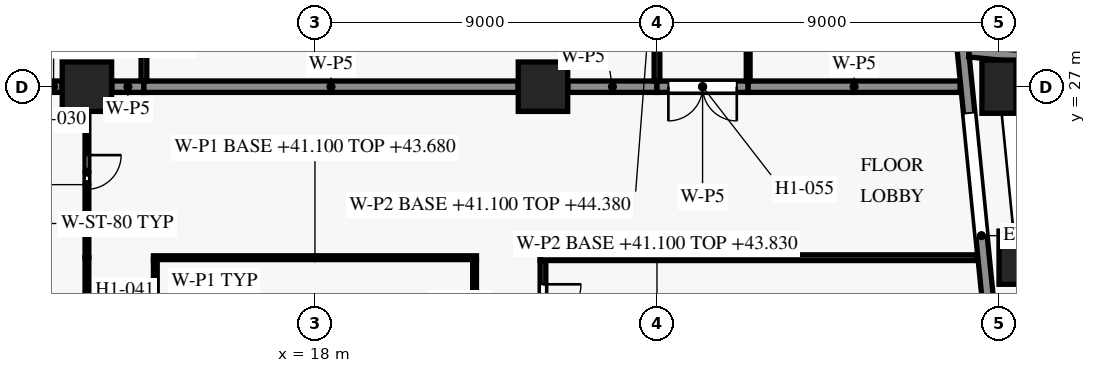
"""IFC4 building model, lengths in metres.
Left out: names, types, materials, properties, quantities, classifications, styles, units other than length and angle.
Written with IfcOpenShell. Run it as: python <this file> out.ifc"""

import sys

from ifc_helpers import new_model, si_unit, direction, frame, frame_2d, origin, origin_2d, place, context, subcontext, project, spatial, rectangle, extrude, element, fill, save


model = new_model("IFC4")
c1 = context("Model", 3, precision=1e-05, world=origin(), true_north=direction((0.0, 1.0)))
c2 = subcontext(c1, "Body", "Model", "MODEL_VIEW")
j1 = project(units=[si_unit("LENGTHUNIT", "METRE"), si_unit("PLANEANGLEUNIT", "RADIAN")], contexts=[c1])
p1 = place(None, origin())
s1 = spatial("IfcSite", under=j1, at=p1, CompositionType="ELEMENT")
p2 = place(p1, origin())
s2 = spatial("IfcBuilding", under=s1, at=p2, CompositionType="ELEMENT")
p3 = place(p2, frame((0.0, 0.0, 41.1)))
s3 = spatial("IfcBuildingStorey", under=s2, at=p3, CompositionType="ELEMENT", Elevation=41.1)
for number, where, z_axis, x_axis in (
    (1, (36.45, 22.5, 0.0), (0.0, 0.0, 1.0), (-0.1, 0.995, 0.0)),
    (2, (36.0, 27.0, 0.0), (0.0, 0.0, 1.0), (-0.1, 0.995, 0.0)),
):
    element("IfcColumn", number, at=place(p3, frame(where, z_axis=z_axis, x_axis=x_axis)), inside=s3, PredefinedType="COLUMN", context=c2, shape_type="SweptSolid", body=[
        extrude(rectangle(XDim=0.9, YDim=1.4, at=origin_2d()), origin(), (0.0, 0.0, 1.0), 3.6),
    ])
for number, where, z_axis, x_axis in (
    (3, (12.0, 27.0, 0.0), (0.0, 0.0, 1.0), (1.0, 0.0, 0.0)),
    (4, (24.0, 27.0, 0.0), (0.0, 0.0, 1.0), (1.0, 0.0, 0.0)),
):
    element("IfcColumn", number, at=place(p3, frame(where, z_axis=z_axis, x_axis=x_axis)), inside=s3, PredefinedType="COLUMN", context=c2, shape_type="SweptSolid", body=[
        extrude(rectangle(XDim=1.3, YDim=1.3, at=origin_2d()), origin(), (0.0, 0.0, 1.0), 3.6),
    ])
p4 = place(p3, frame((35.033, 28.132, 0.0), z_axis=(0.0, 0.0, 1.0), x_axis=(0.099487051997, -0.995038856771, 0.0)))
e5 = element("IfcWall", 5, at=p4, inside=s3, PredefinedType="SOLIDWALL", context=c2, shape_type="SweptSolid", body=[
    extrude(rectangle(XDim=10.152, YDim=0.3, at=frame_2d((5.076, 0.0))), origin(), (0.0, 0.0, 1.0), 2.95),
])
p5 = place(p4, frame((1.833, 0.0, 0.15)))
e6 = element("IfcOpeningElement", 6, at=p5, cuts=e5, PredefinedType="OPENING", context=c2, shape_type="SweptSolid", body=[
    extrude(rectangle(XDim=3.3, YDim=2.4, at=frame_2d((1.65, 1.2))), frame((0.0, 0.16, 0.0), z_axis=(0.0, -1.0, 0.0), x_axis=(1.0, 0.0, 0.0)), (0.0, 0.0, 1.0), 0.32),
])
p6 = place(p4, frame((7.106, 0.0, 0.75)))
e7 = element("IfcOpeningElement", 7, at=p6, cuts=e5, PredefinedType="OPENING", context=c2, shape_type="SweptSolid", body=[
    extrude(rectangle(XDim=1.8, YDim=1.8, at=frame_2d((0.9, 0.9))), frame((0.0, 0.16, 0.0), z_axis=(0.0, -1.0, 0.0), x_axis=(1.0, 0.0, 0.0)), (0.0, 0.0, 1.0), 0.32),
])
p7 = place(p3, frame((45.015, 26.953, 0.0), z_axis=(0.0, 0.0, 1.0), x_axis=(-0.995036699177, 0.099508629231, 0.0)))
e8 = element("IfcWall", 8, at=p7, inside=s3, PredefinedType="SOLIDWALL", context=c2, shape_type="SweptSolid", body=[
    extrude(rectangle(XDim=9.846, YDim=0.3, at=frame_2d((4.923, 0.0))), origin(), (0.0, 0.0, 1.0), 2.95),
])
p8 = place(p7, frame((1.291, 0.0, 0.75)))
e9 = element("IfcOpeningElement", 9, at=p8, cuts=e8, PredefinedType="OPENING", context=c2, shape_type="SweptSolid", body=[
    extrude(rectangle(XDim=1.8, YDim=1.8, at=frame_2d((0.9, 0.9))), frame((0.0, 0.16, 0.0), z_axis=(0.0, -1.0, 0.0), x_axis=(1.0, 0.0, 0.0)), (0.0, 0.0, 1.0), 0.32),
])
p9 = place(p7, frame((5.064, 0.0, 0.15)))
e10 = element("IfcOpeningElement", 10, at=p9, cuts=e8, PredefinedType="OPENING", context=c2, shape_type="SweptSolid", body=[
    extrude(rectangle(XDim=3.3, YDim=2.4, at=frame_2d((1.65, 1.2))), frame((0.0, 0.16, 0.0), z_axis=(0.0, -1.0, 0.0), x_axis=(1.0, 0.0, 0.0)), (0.0, 0.0, 1.0), 0.32),
])
p10 = place(p3, frame((22.2, 18.05, 0.0), z_axis=(0.0, 0.0, 1.0), x_axis=(0.0, 1.0, 0.0)))
e11 = element("IfcWall", 11, at=p10, inside=s3, PredefinedType="PARTITIONING", context=c2, shape_type="SweptSolid", body=[
    extrude(rectangle(XDim=4.4, YDim=0.1, at=frame_2d((2.2, 0.0))), origin(), (0.0, 0.0, 1.0), 2.73),
])
p11 = place(p3, frame((24.0, 22.425, 0.0), z_axis=(0.0, 0.0, 1.0), x_axis=(0.0, -1.0, 0.0)))
e12 = element("IfcWall", 12, at=p11, inside=s3, PredefinedType="PARTITIONING", context=c2, shape_type="SweptSolid", body=[
    extrude(rectangle(XDim=2.25, YDim=0.15, at=frame_2d((1.125, 0.0))), origin(), (0.0, 0.0, 1.0), 2.58),
])
p12 = place(p11, frame((0.625, 0.0, 0.0)))
e13 = element("IfcOpeningElement", 13, at=p12, cuts=e12, PredefinedType="OPENING", context=c2, shape_type="SweptSolid", body=[
    extrude(rectangle(XDim=1.0, YDim=2.1, at=frame_2d((0.5, 1.05))), frame((0.0, 0.085, 0.0), z_axis=(0.0, -1.0, 0.0), x_axis=(1.0, 0.0, 0.0)), (0.0, 0.0, 1.0), 0.17),
])
p13 = place(p3, frame((13.8, 22.45, 0.0), z_axis=(0.0, 0.0, 1.0), x_axis=(0.0, -1.0, 0.0)))
e14 = element("IfcWall", 14, at=p13, inside=s3, PredefinedType="PARTITIONING", context=c2, shape_type="SweptSolid", body=[
    extrude(rectangle(XDim=4.25, YDim=0.1, at=frame_2d((2.125, 0.0))), origin(), (0.0, 0.0, 1.0), 3.28),
])
p14 = place(p13, frame((1.75, 0.0, 0.0)))
e15 = element("IfcOpeningElement", 15, at=p14, cuts=e14, PredefinedType="OPENING", context=c2, shape_type="SweptSolid", body=[
    extrude(rectangle(XDim=0.9, YDim=2.1, at=frame_2d((0.45, 1.05))), frame((0.0, 0.06, 0.0), z_axis=(0.0, -1.0, 0.0), x_axis=(1.0, 0.0, 0.0)), (0.0, 0.0, 1.0), 0.12),
])
p15 = place(p3, frame((12.0, 22.5, 0.0), z_axis=(0.0, 0.0, 1.0), x_axis=(0.0, -1.0, 0.0)))
e16 = element("IfcWall", 16, at=p15, inside=s3, PredefinedType="PARTITIONING", context=c2, shape_type="SweptSolid", body=[
    extrude(rectangle(XDim=3.845, YDim=0.1, at=frame_2d((1.922, 0.0))), origin(), (0.0, 0.0, 1.0), 2.58),
])
p16 = place(p3, frame((12.0, 26.345, 0.0), z_axis=(0.0, 0.0, 1.0), x_axis=(0.0, -1.0, 0.0)))
e17 = element("IfcWall", 17, at=p16, inside=s3, PredefinedType="PARTITIONING", context=c2, shape_type="SweptSolid", body=[
    extrude(rectangle(XDim=3.845, YDim=0.1, at=frame_2d((1.922, 0.0))), origin(), (0.0, 0.0, 1.0), 2.58),
])
p17 = place(p16, frame((1.145, 0.0, 0.0)))
e18 = element("IfcOpeningElement", 18, at=p17, cuts=e17, PredefinedType="OPENING", context=c2, shape_type="SweptSolid", body=[
    extrude(rectangle(XDim=0.9, YDim=2.1, at=frame_2d((0.45, 1.05))), frame((0.0, 0.06, 0.0), z_axis=(0.0, -1.0, 0.0), x_axis=(1.0, 0.0, 0.0)), (0.0, 0.0, 1.0), 0.12),
])
p18 = place(p3, frame((22.25, 22.5, 0.0), z_axis=(0.0, 0.0, 1.0), x_axis=(-1.0, 0.0, 0.0)))
e19 = element("IfcWall", 19, at=p18, inside=s3, PredefinedType="PARTITIONING", context=c2, shape_type="SweptSolid", body=[
    extrude(rectangle(XDim=8.5, YDim=0.1, at=frame_2d((4.25, 0.0))), origin(), (0.0, 0.0, 1.0), 2.58),
])
p19 = place(p3, frame((35.425, 22.5, 0.0), z_axis=(0.0, 0.0, 1.0), x_axis=(-1.0, 0.0, 0.0)))
e20 = element("IfcWall", 20, at=p19, inside=s3, PredefinedType="PARTITIONING", context=c2, shape_type="SweptSolid", body=[
    extrude(rectangle(XDim=11.5, YDim=0.15, at=frame_2d((5.75, 0.0))), origin(), (0.0, 0.0, 1.0), 2.58),
])
p20 = place(p3, frame((11.345, 27.0, 0.0), z_axis=(0.0, 0.0, 1.0), x_axis=(-1.0, 0.0, 0.0)))
e21 = element("IfcWall", 21, at=p20, inside=s3, PredefinedType="PARTITIONING", context=c2, shape_type="SweptSolid", body=[
    extrude(rectangle(XDim=0.445, YDim=0.3, at=frame_2d((0.223, 0.0))), origin(), (0.0, 0.0, 1.0), 3.28),
])
p21 = place(p3, frame((13.5, 27.0, 0.0), z_axis=(0.0, 0.0, 1.0), x_axis=(-1.0, 0.0, 0.0)))
e22 = element("IfcWall", 22, at=p21, inside=s3, PredefinedType="PARTITIONING", context=c2, shape_type="SweptSolid", body=[
    extrude(rectangle(XDim=0.845, YDim=0.3, at=frame_2d((0.422, 0.0))), origin(), (0.0, 0.0, 1.0), 2.58),
])
p22 = place(p3, frame((23.345, 27.0, 0.0), z_axis=(0.0, 0.0, 1.0), x_axis=(-1.0, 0.0, 0.0)))
e23 = element("IfcWall", 23, at=p22, inside=s3, PredefinedType="PARTITIONING", context=c2, shape_type="SweptSolid", body=[
    extrude(rectangle(XDim=9.845, YDim=0.3, at=frame_2d((4.922, 0.0))), origin(), (0.0, 0.0, 1.0), 2.58),
])
p23 = place(p3, frame((27.0, 27.0, 0.0), z_axis=(0.0, 0.0, 1.0), x_axis=(-1.0, 0.0, 0.0)))
e24 = element("IfcWall", 24, at=p23, inside=s3, PredefinedType="PARTITIONING", context=c2, shape_type="SweptSolid", body=[
    extrude(rectangle(XDim=2.345, YDim=0.3, at=frame_2d((1.172, 0.0))), origin(), (0.0, 0.0, 1.0), 2.58),
])
p24 = place(p3, frame((29.4, 27.0, 0.0), z_axis=(0.0, 0.0, 1.0), x_axis=(-1.0, 0.0, 0.0)))
e25 = element("IfcWall", 25, at=p24, inside=s3, PredefinedType="PARTITIONING", context=c2, shape_type="SweptSolid", body=[
    extrude(rectangle(XDim=2.4, YDim=0.3, at=frame_2d((1.2, 0.0))), origin(), (0.0, 0.0, 1.0), 2.58),
])
p25 = place(p24, frame((0.3, 0.0, 0.0)))
e26 = element("IfcOpeningElement", 26, at=p25, cuts=e25, PredefinedType="OPENING", context=c2, shape_type="SweptSolid", body=[
    extrude(rectangle(XDim=1.8, YDim=2.1, at=frame_2d((0.9, 1.05))), frame((0.0, 0.16, 0.0), z_axis=(0.0, -1.0, 0.0), x_axis=(1.0, 0.0, 0.0)), (0.0, 0.0, 1.0), 0.32),
])
p26 = place(p3, frame((34.975, 27.0, 0.0), z_axis=(0.0, 0.0, 1.0), x_axis=(-1.0, 0.0, 0.0)))
e27 = element("IfcWall", 27, at=p26, inside=s3, PredefinedType="PARTITIONING", context=c2, shape_type="SweptSolid", body=[
    extrude(rectangle(XDim=5.575, YDim=0.3, at=frame_2d((2.788, 0.0))), origin(), (0.0, 0.0, 1.0), 2.58),
])
p27 = place(p3, frame((27.0, 27.15, 0.0), z_axis=(0.0, 0.0, 1.0), x_axis=(0.0, 1.0, 0.0)))
e28 = element("IfcWall", 28, at=p27, inside=s3, PredefinedType="PARTITIONING", context=c2, shape_type="SweptSolid", body=[
    extrude(rectangle(XDim=8.7, YDim=0.15, at=frame_2d((4.35, 0.0))), origin(), (0.0, 0.0, 1.0), 3.28),
])
p28 = place(p27, frame((3.45, 0.0, 0.0)))
e29 = element("IfcOpeningElement", 29, at=p28, cuts=e28, PredefinedType="OPENING", context=c2, shape_type="SweptSolid", body=[
    extrude(rectangle(XDim=1.8, YDim=2.1, at=frame_2d((0.9, 1.05))), frame((0.0, 0.085, 0.0), z_axis=(0.0, -1.0, 0.0), x_axis=(1.0, 0.0, 0.0)), (0.0, 0.0, 1.0), 0.17),
])
p29 = place(p3, frame((13.5, 27.15, 0.0), z_axis=(0.0, 0.0, 1.0), x_axis=(0.0, 1.0, 0.0)))
e30 = element("IfcWall", 30, at=p29, inside=s3, PredefinedType="PARTITIONING", context=c2, shape_type="SweptSolid", body=[
    extrude(rectangle(XDim=8.7, YDim=0.15, at=frame_2d((4.35, 0.0))), origin(), (0.0, 0.0, 1.0), 3.28),
])
p30 = place(p29, frame((3.45, 0.0, 0.0)))
e31 = element("IfcOpeningElement", 31, at=p30, cuts=e30, PredefinedType="OPENING", context=c2, shape_type="SweptSolid", body=[
    extrude(rectangle(XDim=1.8, YDim=2.1, at=frame_2d((0.9, 1.05))), frame((0.0, 0.085, 0.0), z_axis=(0.0, -1.0, 0.0), x_axis=(1.0, 0.0, 0.0)), (0.0, 0.0, 1.0), 0.17),
])
p31 = place(p3, frame((29.4, 35.95, 0.0), z_axis=(0.0, 0.0, 1.0), x_axis=(0.0, -1.0, 0.0)))
e32 = element("IfcWall", 32, at=p31, inside=s3, PredefinedType="PARTITIONING", context=c2, shape_type="SweptSolid", body=[
    extrude(rectangle(XDim=8.8, YDim=0.1, at=frame_2d((4.4, 0.0))), origin(), (0.0, 0.0, 1.0), 3.28),
])
p32 = place(p31, frame((4.5, 0.0, 0.0)))
e33 = element("IfcOpeningElement", 33, at=p32, cuts=e32, PredefinedType="OPENING", context=c2, shape_type="SweptSolid", body=[
    extrude(rectangle(XDim=0.9, YDim=2.1, at=frame_2d((0.45, 1.05))), frame((0.0, 0.06, 0.0), z_axis=(0.0, -1.0, 0.0), x_axis=(1.0, 0.0, 0.0)), (0.0, 0.0, 1.0), 0.12),
])
p33 = place(p5, origin())
e34 = element("IfcWindow", 34, at=p33, inside=s3, PartitioningType="SINGLE_PANEL", PredefinedType="WINDOW", context=c2, shape_type="SweptSolid", body=[
    extrude(rectangle(XDim=3.3, YDim=2.4, at=frame_2d((1.65, 1.2))), frame((0.0, 0.03, 0.0), z_axis=(0.0, -1.0, 0.0), x_axis=(1.0, 0.0, 0.0)), (0.0, 0.0, 1.0), 0.06),
])
fill(e6, e34)
p34 = place(p17, origin())
e35 = element("IfcDoor", 35, at=p34, inside=s3, OperationType="SINGLE_SWING_LEFT", PredefinedType="DOOR", context=c2, shape_type="SweptSolid", body=[
    extrude(rectangle(XDim=0.9, YDim=2.1, at=frame_2d((0.45, 1.05))), frame((0.0, 0.025, 0.0), z_axis=(0.0, -1.0, 0.0), x_axis=(1.0, 0.0, 0.0)), (0.0, 0.0, 1.0), 0.05),
])
fill(e18, e35)
p35 = place(p12, origin())
e36 = element("IfcDoor", 36, at=p35, inside=s3, OperationType="SINGLE_SWING_LEFT", PredefinedType="DOOR", context=c2, shape_type="SweptSolid", body=[
    extrude(rectangle(XDim=1.0, YDim=2.1, at=frame_2d((0.5, 1.05))), frame((0.0, 0.025, 0.0), z_axis=(0.0, -1.0, 0.0), x_axis=(1.0, 0.0, 0.0)), (0.0, 0.0, 1.0), 0.05),
])
fill(e13, e36)
p36 = place(p25, origin())
e37 = element("IfcDoor", 37, at=p36, inside=s3, OperationType="DOUBLE_DOOR_SINGLE_SWING", PredefinedType="DOOR", context=c2, shape_type="SweptSolid", body=[
    extrude(rectangle(XDim=1.8, YDim=2.1, at=frame_2d((0.9, 1.05))), frame((0.0, 0.025, 0.0), z_axis=(0.0, -1.0, 0.0), x_axis=(1.0, 0.0, 0.0)), (0.0, 0.0, 1.0), 0.05),
])
fill(e26, e37)
save(model, sys.argv[1])
